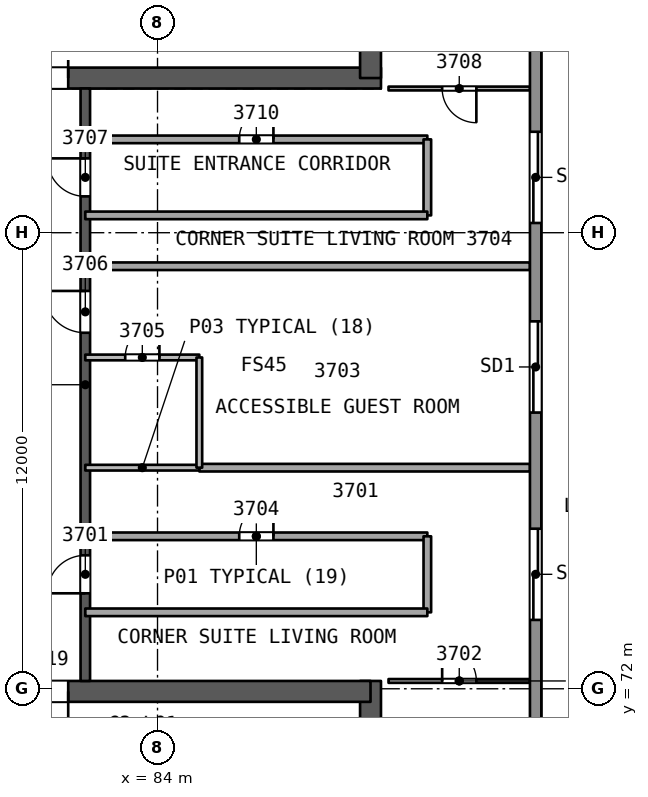
"""IFC4 building model, lengths in metres.
Left out: names, types, materials, properties, quantities, classifications, styles, units other than length and angle.
Written with IfcOpenShell. Run it as: python <this file> out.ifc"""

import sys

from ifc_helpers import new_model, si_unit, direction, frame, frame_2d, origin, place, context, subcontext, project, spatial, rectangle, extrude, element, fill, save


model = new_model("IFC4")
c1 = context("Model", 3, precision=1e-05, world=origin(), true_north=direction((0.0, 1.0)))
c2 = subcontext(c1, "Body", "Model", "MODEL_VIEW")
j1 = project(units=[si_unit("LENGTHUNIT", "METRE"), si_unit("PLANEANGLEUNIT", "RADIAN")], contexts=[c1])
p1 = place(None, origin())
s1 = spatial("IfcSite", under=j1, at=p1, CompositionType="ELEMENT")
p2 = place(p1, origin())
s2 = spatial("IfcBuilding", under=s1, at=p2, CompositionType="ELEMENT")
p3 = place(p2, frame((0.0, 0.0, 156.3)))
s3 = spatial("IfcBuildingStorey", under=s2, at=p3, CompositionType="ELEMENT", Elevation=156.3)
p4 = place(p3, frame((79.659, 88.069, 0.0), z_axis=(0.0, 0.0, 1.0), x_axis=(1.0, 0.0, 0.0)))
e1 = element("IfcWall", 1, at=p4, inside=s3, PredefinedType="SHEAR", context=c2, shape_type="SweptSolid", body=[
    extrude(rectangle(XDim=10.221, YDim=0.55, at=frame_2d((5.111, 0.0))), origin(), (0.0, 0.0, 1.0), 3.7),
])
p5 = place(p4, frame((0.791, 0.0, 0.0)))
e2 = element("IfcOpeningElement", 2, at=p5, cuts=e1, PredefinedType="OPENING", context=c2, shape_type="SweptSolid", body=[
    extrude(rectangle(XDim=1.2, YDim=2.1, at=frame_2d((0.6, 1.05))), frame((0.0, 0.286, 0.0), z_axis=(0.0, -1.0, 0.0), x_axis=(1.0, 0.0, 0.0)), (0.0, 0.0, 1.0), 0.571),
])
p6 = place(p3, frame((89.605, 88.069, 0.0), z_axis=(0.0, 0.0, 1.0), x_axis=(0.0, 1.0, 0.0)))
e3 = element("IfcWall", 3, at=p6, inside=s3, PredefinedType="SHEAR", context=c2, shape_type="SweptSolid", body=[
    extrude(rectangle(XDim=14.058, YDim=0.55, at=frame_2d((7.029, 0.0))), origin(), (0.0, 0.0, 1.0), 3.7),
])
p7 = place(p3, frame((89.605, 58.031, 0.0), z_axis=(0.0, 0.0, 1.0), x_axis=(0.0, 1.0, 0.0)))
e4 = element("IfcWall", 4, at=p7, inside=s3, PredefinedType="SHEAR", context=c2, shape_type="SweptSolid", body=[
    extrude(rectangle(XDim=14.175, YDim=0.55, at=frame_2d((7.087, 0.0))), origin(), (0.0, 0.0, 1.0), 3.7),
])
p8 = place(p3, frame((89.605, 71.931, 0.0), z_axis=(0.0, 0.0, 1.0), x_axis=(-1.0, 0.0, 0.0)))
e5 = element("IfcWall", 5, at=p8, inside=s3, PredefinedType="SHEAR", context=c2, shape_type="SweptSolid", body=[
    extrude(rectangle(XDim=10.105, YDim=0.55, at=frame_2d((5.052, 0.0))), origin(), (0.0, 0.0, 1.0), 3.7),
])
p9 = place(p8, frame((7.955, 0.0, 0.0)))
e6 = element("IfcOpeningElement", 6, at=p9, cuts=e5, PredefinedType="OPENING", context=c2, shape_type="SweptSolid", body=[
    extrude(rectangle(XDim=1.2, YDim=2.1, at=frame_2d((0.6, 1.05))), frame((0.0, 0.286, 0.0), z_axis=(0.0, -1.0, 0.0), x_axis=(1.0, 0.0, 0.0)), (0.0, 0.0, 1.0), 0.571),
])
p10 = place(p3, frame((82.1, 72.206, 0.0), z_axis=(0.0, 0.0, 1.0), x_axis=(0.0, 1.0, 0.0)))
e7 = element("IfcWall", 7, at=p10, inside=s3, PredefinedType="SHEAR", context=c2, shape_type="SweptSolid", body=[
    extrude(rectangle(XDim=15.588, YDim=0.25, at=frame_2d((7.794, 0.0))), origin(), (0.0, 0.0, 1.0), 3.25),
])
p11 = place(p10, frame((2.306, 0.0, 0.0)))
e8 = element("IfcOpeningElement", 8, at=p11, cuts=e7, PredefinedType="OPENING", context=c2, shape_type="SweptSolid", body=[
    extrude(rectangle(XDim=1.0, YDim=2.1, at=frame_2d((0.5, 1.05))), frame((0.0, 0.135, 0.0), z_axis=(0.0, -1.0, 0.0), x_axis=(1.0, 0.0, 0.0)), (0.0, 0.0, 1.0), 0.271),
])
p12 = place(p10, frame((9.162, 0.0, 0.0)))
e9 = element("IfcOpeningElement", 9, at=p12, cuts=e7, PredefinedType="OPENING", context=c2, shape_type="SweptSolid", body=[
    extrude(rectangle(XDim=1.1, YDim=2.1, at=frame_2d((0.55, 1.05))), frame((0.0, 0.135, 0.0), z_axis=(0.0, -1.0, 0.0), x_axis=(1.0, 0.0, 0.0)), (0.0, 0.0, 1.0), 0.271),
])
p13 = place(p10, frame((12.75, 0.0, 0.0)))
e10 = element("IfcOpeningElement", 10, at=p13, cuts=e7, PredefinedType="OPENING", context=c2, shape_type="SweptSolid", body=[
    extrude(rectangle(XDim=1.0, YDim=2.1, at=frame_2d((0.5, 1.05))), frame((0.0, 0.135, 0.0), z_axis=(0.0, -1.0, 0.0), x_axis=(1.0, 0.0, 0.0)), (0.0, 0.0, 1.0), 0.271),
])
p14 = place(p3, frame((90.079, 72.206, 0.0), z_axis=(0.0, 0.0, 1.0), x_axis=(1.0, 0.0, 0.0)))
e11 = element("IfcWall", 11, at=p14, inside=s3, PredefinedType="PARTITIONING", context=c2, shape_type="SweptSolid", body=[
    extrude(rectangle(XDim=3.722, YDim=0.1, at=frame_2d((1.861, 0.0))), origin(), (0.0, 0.0, 1.0), 3.25),
])
p15 = place(p14, frame((1.411, 0.0, 0.0)))
e12 = element("IfcOpeningElement", 12, at=p15, cuts=e11, PredefinedType="OPENING", context=c2, shape_type="SweptSolid", body=[
    extrude(rectangle(XDim=0.9, YDim=2.1, at=frame_2d((0.45, 1.05))), frame((0.0, 0.061, 0.0), z_axis=(0.0, -1.0, 0.0), x_axis=(1.0, 0.0, 0.0)), (0.0, 0.0, 1.0), 0.121),
])
p16 = place(p3, frame((82.1, 76.012, 0.0), z_axis=(0.0, 0.0, 1.0), x_axis=(1.0, 0.0, 0.0)))
e13 = element("IfcWall", 13, at=p16, inside=s3, PredefinedType="PARTITIONING", context=c2, shape_type="SweptSolid", body=[
    extrude(rectangle(XDim=9.0, YDim=0.2, at=frame_2d((4.5, 0.0))), origin(), (0.0, 0.0, 1.0), 3.25),
])
p17 = place(p16, frame((4.05, 0.0, 0.0)))
e14 = element("IfcOpeningElement", 14, at=p17, cuts=e13, PredefinedType="OPENING", context=c2, shape_type="SweptSolid", body=[
    extrude(rectangle(XDim=0.9, YDim=2.1, at=frame_2d((0.45, 1.05))), frame((0.0, 0.11, 0.0), z_axis=(0.0, -1.0, 0.0), x_axis=(1.0, 0.0, 0.0)), (0.0, 0.0, 1.0), 0.221),
])
p18 = place(p3, frame((91.1, 76.012, 0.0), z_axis=(0.0, 0.0, 1.0), x_axis=(0.0, -1.0, 0.0)))
e15 = element("IfcWall", 15, at=p18, inside=s3, PredefinedType="PARTITIONING", context=c2, shape_type="SweptSolid", body=[
    extrude(rectangle(XDim=2.0, YDim=0.2, at=frame_2d((1.0, 0.0))), origin(), (0.0, 0.0, 1.0), 3.25),
])
p19 = place(p3, frame((91.1, 74.012, 0.0), z_axis=(0.0, 0.0, 1.0), x_axis=(-1.0, 0.0, 0.0)))
e16 = element("IfcWall", 16, at=p19, inside=s3, PredefinedType="PARTITIONING", context=c2, shape_type="SweptSolid", body=[
    extrude(rectangle(XDim=9.0, YDim=0.2, at=frame_2d((4.5, 0.0))), origin(), (0.0, 0.0, 1.0), 3.25),
])
p20 = place(p3, frame((93.801, 77.818, 0.0), z_axis=(0.0, 0.0, 1.0), x_axis=(-1.0, 0.0, 0.0)))
e17 = element("IfcWall", 17, at=p20, inside=s3, PredefinedType="PARTITIONING", context=c2, shape_type="SweptSolid", body=[
    extrude(rectangle(XDim=8.701, YDim=0.2, at=frame_2d((4.351, 0.0))), origin(), (0.0, 0.0, 1.0), 3.25),
])
p21 = place(p3, frame((85.1, 77.818, 0.0), z_axis=(0.0, 0.0, 1.0), x_axis=(-1.0, 0.0, 0.0)))
e18 = element("IfcWall", 18, at=p21, inside=s3, PredefinedType="PARTITIONING", context=c2, shape_type="SweptSolid", body=[
    extrude(rectangle(XDim=3.0, YDim=0.15, at=frame_2d((1.5, 0.0))), origin(), (0.0, 0.0, 1.0), 3.25),
])
p22 = place(p3, frame((82.1, 80.718, 0.0), z_axis=(0.0, 0.0, 1.0), x_axis=(1.0, 0.0, 0.0)))
e19 = element("IfcWall", 19, at=p22, inside=s3, PredefinedType="PARTITIONING", context=c2, shape_type="SweptSolid", body=[
    extrude(rectangle(XDim=3.0, YDim=0.15, at=frame_2d((1.5, 0.0))), origin(), (0.0, 0.0, 1.0), 3.25),
])
p23 = place(p22, frame((1.05, 0.0, 0.0)))
e20 = element("IfcOpeningElement", 20, at=p23, cuts=e19, PredefinedType="OPENING", context=c2, shape_type="SweptSolid", body=[
    extrude(rectangle(XDim=0.9, YDim=2.1, at=frame_2d((0.45, 1.05))), frame((0.0, 0.085, 0.0), z_axis=(0.0, -1.0, 0.0), x_axis=(1.0, 0.0, 0.0)), (0.0, 0.0, 1.0), 0.171),
])
p24 = place(p3, frame((85.1, 80.718, 0.0), z_axis=(0.0, 0.0, 1.0), x_axis=(0.0, -1.0, 0.0)))
e21 = element("IfcWall", 21, at=p24, inside=s3, PredefinedType="PARTITIONING", context=c2, shape_type="SweptSolid", body=[
    extrude(rectangle(XDim=2.9, YDim=0.15, at=frame_2d((1.45, 0.0))), origin(), (0.0, 0.0, 1.0), 3.25),
])
p25 = place(p3, frame((93.801, 83.118, 0.0), z_axis=(0.0, 0.0, 1.0), x_axis=(-1.0, 0.0, 0.0)))
e22 = element("IfcWall", 22, at=p25, inside=s3, PredefinedType="PARTITIONING", context=c2, shape_type="SweptSolid", body=[
    extrude(rectangle(XDim=11.701, YDim=0.2, at=frame_2d((5.851, 0.0))), origin(), (0.0, 0.0, 1.0), 3.25),
])
p26 = place(p3, frame((93.801, 87.794, 0.0), z_axis=(0.0, 0.0, 1.0), x_axis=(-1.0, 0.0, 0.0)))
e23 = element("IfcWall", 23, at=p26, inside=s3, PredefinedType="PARTITIONING", context=c2, shape_type="SweptSolid", body=[
    extrude(rectangle(XDim=3.722, YDim=0.1, at=frame_2d((1.861, 0.0))), origin(), (0.0, 0.0, 1.0), 3.25),
])
p27 = place(p26, frame((1.411, 0.0, 0.0)))
e24 = element("IfcOpeningElement", 24, at=p27, cuts=e23, PredefinedType="OPENING", context=c2, shape_type="SweptSolid", body=[
    extrude(rectangle(XDim=0.9, YDim=2.1, at=frame_2d((0.45, 1.05))), frame((0.0, 0.061, 0.0), z_axis=(0.0, -1.0, 0.0), x_axis=(1.0, 0.0, 0.0)), (0.0, 0.0, 1.0), 0.121),
])
p28 = place(p3, frame((82.1, 86.456, 0.0), z_axis=(0.0, 0.0, 1.0), x_axis=(1.0, 0.0, 0.0)))
e25 = element("IfcWall", 25, at=p28, inside=s3, PredefinedType="PARTITIONING", context=c2, shape_type="SweptSolid", body=[
    extrude(rectangle(XDim=9.0, YDim=0.2, at=frame_2d((4.5, 0.0))), origin(), (0.0, 0.0, 1.0), 3.25),
])
p29 = place(p28, frame((4.05, 0.0, 0.0)))
e26 = element("IfcOpeningElement", 26, at=p29, cuts=e25, PredefinedType="OPENING", context=c2, shape_type="SweptSolid", body=[
    extrude(rectangle(XDim=0.9, YDim=2.1, at=frame_2d((0.45, 1.05))), frame((0.0, 0.11, 0.0), z_axis=(0.0, -1.0, 0.0), x_axis=(1.0, 0.0, 0.0)), (0.0, 0.0, 1.0), 0.221),
])
p30 = place(p3, frame((91.1, 86.456, 0.0), z_axis=(0.0, 0.0, 1.0), x_axis=(0.0, -1.0, 0.0)))
e27 = element("IfcWall", 27, at=p30, inside=s3, PredefinedType="PARTITIONING", context=c2, shape_type="SweptSolid", body=[
    extrude(rectangle(XDim=2.0, YDim=0.2, at=frame_2d((1.0, 0.0))), origin(), (0.0, 0.0, 1.0), 3.25),
])
p31 = place(p3, frame((91.1, 84.456, 0.0), z_axis=(0.0, 0.0, 1.0), x_axis=(-1.0, 0.0, 0.0)))
e28 = element("IfcWall", 28, at=p31, inside=s3, PredefinedType="PARTITIONING", context=c2, shape_type="SweptSolid", body=[
    extrude(rectangle(XDim=9.0, YDim=0.2, at=frame_2d((4.5, 0.0))), origin(), (0.0, 0.0, 1.0), 3.25),
])
p32 = place(p3, frame((93.95, 107.247, 0.0), z_axis=(0.0, 0.0, 1.0), x_axis=(0.0, -1.0, 0.0)))
e29 = element("IfcWall", 29, at=p32, inside=s3, PredefinedType="SOLIDWALL", context=c2, shape_type="SweptSolid", body=[
    extrude(rectangle(XDim=54.494, YDim=0.3, at=frame_2d((27.247, 0.0))), origin(), (0.0, 0.0, 1.0), 3.25),
])
p33 = place(p32, frame((25.579, 0.0, 0.0)))
e30 = element("IfcOpeningElement", 30, at=p33, cuts=e29, PredefinedType="OPENING", context=c2, shape_type="SweptSolid", body=[
    extrude(rectangle(XDim=2.4, YDim=2.4, at=frame_2d((1.2, 1.2))), frame((0.0, 0.161, 0.0), z_axis=(0.0, -1.0, 0.0), x_axis=(1.0, 0.0, 0.0)), (0.0, 0.0, 1.0), 0.321),
])
p34 = place(p32, frame((31.035, 0.0, 0.0)))
e31 = element("IfcOpeningElement", 31, at=p34, cuts=e29, PredefinedType="OPENING", context=c2, shape_type="SweptSolid", body=[
    extrude(rectangle(XDim=2.4, YDim=2.4, at=frame_2d((1.2, 1.2))), frame((0.0, 0.161, 0.0), z_axis=(0.0, -1.0, 0.0), x_axis=(1.0, 0.0, 0.0)), (0.0, 0.0, 1.0), 0.321),
])
p35 = place(p32, frame((42.339, 0.0, 0.0)))
e32 = element("IfcOpeningElement", 32, at=p35, cuts=e29, PredefinedType="OPENING", context=c2, shape_type="SweptSolid", body=[
    extrude(rectangle(XDim=2.4, YDim=2.4, at=frame_2d((1.2, 1.2))), frame((0.0, 0.161, 0.0), z_axis=(0.0, -1.0, 0.0), x_axis=(1.0, 0.0, 0.0)), (0.0, 0.0, 1.0), 0.321),
])
p36 = place(p32, frame((20.591, 0.0, 0.0)))
e33 = element("IfcOpeningElement", 33, at=p36, cuts=e29, PredefinedType="OPENING", context=c2, shape_type="SweptSolid", body=[
    extrude(rectangle(XDim=2.4, YDim=2.4, at=frame_2d((1.2, 1.2))), frame((0.0, 0.161, 0.0), z_axis=(0.0, -1.0, 0.0), x_axis=(1.0, 0.0, 0.0)), (0.0, 0.0, 1.0), 0.321),
])
p37 = place(p32, frame((9.744, 0.0, 0.0)))
e34 = element("IfcOpeningElement", 34, at=p37, cuts=e29, PredefinedType="OPENING", context=c2, shape_type="SweptSolid", body=[
    extrude(rectangle(XDim=2.4, YDim=2.4, at=frame_2d((1.2, 1.2))), frame((0.0, 0.161, 0.0), z_axis=(0.0, -1.0, 0.0), x_axis=(1.0, 0.0, 0.0)), (0.0, 0.0, 1.0), 0.321),
])
p38 = place(p3, frame((41.928, 82.788, 0.0), z_axis=(0.0, 0.0, 1.0), x_axis=(0.866025629663, 0.499999608766, 0.0)))
e35 = element("IfcWall", 35, at=p38, inside=s3, PredefinedType="SOLIDWALL", context=c2, shape_type="SweptSolid", body=[
    extrude(rectangle(XDim=54.494, YDim=0.3, at=frame_2d((27.247, 0.0))), origin(), (0.0, 0.0, 1.0), 3.25),
])
p39 = place(p38, frame((26.826, 0.0, 0.0)))
e36 = element("IfcOpeningElement", 36, at=p39, cuts=e35, PredefinedType="OPENING", context=c2, shape_type="SweptSolid", body=[
    extrude(rectangle(XDim=2.4, YDim=2.4, at=frame_2d((1.2, 1.2))), frame((0.0, 0.161, 0.0), z_axis=(0.0, -1.0, 0.0), x_axis=(1.0, 0.0, 0.0)), (0.0, 0.0, 1.0), 0.321),
])
p40 = place(p38, frame((31.815, 0.0, 0.0)))
e37 = element("IfcOpeningElement", 37, at=p40, cuts=e35, PredefinedType="OPENING", context=c2, shape_type="SweptSolid", body=[
    extrude(rectangle(XDim=2.4, YDim=2.4, at=frame_2d((1.2, 1.2))), frame((0.0, 0.161, 0.0), z_axis=(0.0, -1.0, 0.0), x_axis=(1.0, 0.0, 0.0)), (0.0, 0.0, 1.0), 0.321),
])
p41 = place(p38, frame((42.339, 0.0, 0.0)))
e38 = element("IfcOpeningElement", 38, at=p41, cuts=e35, PredefinedType="OPENING", context=c2, shape_type="SweptSolid", body=[
    extrude(rectangle(XDim=2.4, YDim=2.4, at=frame_2d((1.2, 1.2))), frame((0.0, 0.161, 0.0), z_axis=(0.0, -1.0, 0.0), x_axis=(1.0, 0.0, 0.0)), (0.0, 0.0, 1.0), 0.321),
])
p42 = place(p38, frame((11.289, 0.0, 0.0)))
e39 = element("IfcOpeningElement", 39, at=p42, cuts=e35, PredefinedType="OPENING", context=c2, shape_type="SweptSolid", body=[
    extrude(rectangle(XDim=2.4, YDim=2.4, at=frame_2d((1.2, 1.2))), frame((0.0, 0.161, 0.0), z_axis=(0.0, -1.0, 0.0), x_axis=(1.0, 0.0, 0.0)), (0.0, 0.0, 1.0), 0.321),
])
p43 = place(p3, frame((89.122, 49.965, 0.0), z_axis=(0.0, 0.0, 1.0), x_axis=(-0.866025629663, 0.499999608766, 0.0)))
e40 = element("IfcWall", 40, at=p43, inside=s3, PredefinedType="SOLIDWALL", context=c2, shape_type="SweptSolid", body=[
    extrude(rectangle(XDim=54.494, YDim=0.3, at=frame_2d((27.247, 0.0))), origin(), (0.0, 0.0, 1.0), 3.25),
])
p44 = place(p43, frame((41.273, 0.0, 0.0)))
e41 = element("IfcOpeningElement", 41, at=p44, cuts=e40, PredefinedType="OPENING", context=c2, shape_type="SweptSolid", body=[
    extrude(rectangle(XDim=2.4, YDim=2.4, at=frame_2d((1.2, 1.2))), frame((0.0, 0.161, 0.0), z_axis=(0.0, -1.0, 0.0), x_axis=(1.0, 0.0, 0.0)), (0.0, 0.0, 1.0), 0.321),
])
p45 = place(p43, frame((11.289, 0.0, 0.0)))
e42 = element("IfcOpeningElement", 42, at=p45, cuts=e40, PredefinedType="OPENING", context=c2, shape_type="SweptSolid", body=[
    extrude(rectangle(XDim=2.4, YDim=2.4, at=frame_2d((1.2, 1.2))), frame((0.0, 0.161, 0.0), z_axis=(0.0, -1.0, 0.0), x_axis=(1.0, 0.0, 0.0)), (0.0, 0.0, 1.0), 0.321),
])
p46 = place(p43, frame((28.14, 0.0, 0.9)))
e43 = element("IfcOpeningElement", 43, at=p46, cuts=e40, PredefinedType="OPENING", context=c2, shape_type="SweptSolid", body=[
    extrude(rectangle(XDim=1.8, YDim=1.5, at=frame_2d((0.9, 0.75))), frame((0.0, 0.161, 0.0), z_axis=(0.0, -1.0, 0.0), x_axis=(1.0, 0.0, 0.0)), (0.0, 0.0, 1.0), 0.321),
])
p47 = place(p43, frame((25.49, 0.0, 0.9)))
e44 = element("IfcOpeningElement", 44, at=p47, cuts=e40, PredefinedType="OPENING", context=c2, shape_type="SweptSolid", body=[
    extrude(rectangle(XDim=1.8, YDim=1.5, at=frame_2d((0.9, 0.75))), frame((0.0, 0.161, 0.0), z_axis=(0.0, -1.0, 0.0), x_axis=(1.0, 0.0, 0.0)), (0.0, 0.0, 1.0), 0.321),
])
p48 = place(p11, origin())
e45 = element("IfcDoor", 45, at=p48, inside=s3, OperationType="SINGLE_SWING_LEFT", PredefinedType="NOTDEFINED", context=c2, shape_type="SweptSolid", body=[
    extrude(rectangle(XDim=1.0, YDim=2.1, at=frame_2d((0.5, 1.05))), frame((0.0, 0.025, 0.0), z_axis=(0.0, -1.0, 0.0), x_axis=(1.0, 0.0, 0.0)), (0.0, 0.0, 1.0), 0.05),
])
fill(e8, e45)
p49 = place(p15, origin())
e46 = element("IfcDoor", 46, at=p49, inside=s3, OperationType="SINGLE_SWING_LEFT", PredefinedType="NOTDEFINED", context=c2, shape_type="SweptSolid", body=[
    extrude(rectangle(XDim=0.9, YDim=2.1, at=frame_2d((0.45, 1.05))), frame((0.0, 0.025, 0.0), z_axis=(0.0, -1.0, 0.0), x_axis=(1.0, 0.0, 0.0)), (0.0, 0.0, 1.0), 0.05),
])
fill(e12, e46)
p50 = place(p17, origin())
e47 = element("IfcDoor", 47, at=p50, inside=s3, OperationType="SINGLE_SWING_RIGHT", PredefinedType="NOTDEFINED", context=c2, shape_type="SweptSolid", body=[
    extrude(rectangle(XDim=0.9, YDim=2.1, at=frame_2d((0.45, 1.05))), frame((0.0, 0.025, 0.0), z_axis=(0.0, -1.0, 0.0), x_axis=(1.0, 0.0, 0.0)), (0.0, 0.0, 1.0), 0.05),
])
fill(e14, e47)
p51 = place(p23, origin())
e48 = element("IfcDoor", 48, at=p51, inside=s3, OperationType="SINGLE_SWING_RIGHT", PredefinedType="NOTDEFINED", context=c2, shape_type="SweptSolid", body=[
    extrude(rectangle(XDim=0.9, YDim=2.1, at=frame_2d((0.45, 1.05))), frame((0.0, 0.025, 0.0), z_axis=(0.0, -1.0, 0.0), x_axis=(1.0, 0.0, 0.0)), (0.0, 0.0, 1.0), 0.05),
])
fill(e20, e48)
p52 = place(p12, origin())
e49 = element("IfcDoor", 49, at=p52, inside=s3, OperationType="SINGLE_SWING_RIGHT", PredefinedType="NOTDEFINED", context=c2, shape_type="SweptSolid", body=[
    extrude(rectangle(XDim=1.1, YDim=2.1, at=frame_2d((0.55, 1.05))), frame((0.0, 0.025, 0.0), z_axis=(0.0, -1.0, 0.0), x_axis=(1.0, 0.0, 0.0)), (0.0, 0.0, 1.0), 0.05),
])
fill(e9, e49)
p53 = place(p13, origin())
e50 = element("IfcDoor", 50, at=p53, inside=s3, OperationType="SINGLE_SWING_RIGHT", PredefinedType="NOTDEFINED", context=c2, shape_type="SweptSolid", body=[
    extrude(rectangle(XDim=1.0, YDim=2.1, at=frame_2d((0.5, 1.05))), frame((0.0, 0.025, 0.0), z_axis=(0.0, -1.0, 0.0), x_axis=(1.0, 0.0, 0.0)), (0.0, 0.0, 1.0), 0.05),
])
fill(e10, e50)
p54 = place(p27, origin())
e51 = element("IfcDoor", 51, at=p54, inside=s3, OperationType="SINGLE_SWING_LEFT", PredefinedType="NOTDEFINED", context=c2, shape_type="SweptSolid", body=[
    extrude(rectangle(XDim=0.9, YDim=2.1, at=frame_2d((0.45, 1.05))), frame((0.0, 0.025, 0.0), z_axis=(0.0, -1.0, 0.0), x_axis=(1.0, 0.0, 0.0)), (0.0, 0.0, 1.0), 0.05),
])
fill(e24, e51)
p55 = place(p29, origin())
e52 = element("IfcDoor", 52, at=p55, inside=s3, OperationType="SINGLE_SWING_RIGHT", PredefinedType="NOTDEFINED", context=c2, shape_type="SweptSolid", body=[
    extrude(rectangle(XDim=0.9, YDim=2.1, at=frame_2d((0.45, 1.05))), frame((0.0, 0.025, 0.0), z_axis=(0.0, -1.0, 0.0), x_axis=(1.0, 0.0, 0.0)), (0.0, 0.0, 1.0), 0.05),
])
fill(e26, e52)
p56 = place(p33, origin())
e53 = element("IfcDoor", 53, at=p56, inside=s3, OperationType="SLIDING_TO_LEFT", PredefinedType="NOTDEFINED", context=c2, shape_type="SweptSolid", body=[
    extrude(rectangle(XDim=2.4, YDim=2.4, at=frame_2d((1.2, 1.2))), frame((0.0, 0.025, 0.0), z_axis=(0.0, -1.0, 0.0), x_axis=(1.0, 0.0, 0.0)), (0.0, 0.0, 1.0), 0.05),
])
fill(e30, e53)
p57 = place(p34, origin())
e54 = element("IfcDoor", 54, at=p57, inside=s3, OperationType="SLIDING_TO_RIGHT", PredefinedType="NOTDEFINED", context=c2, shape_type="SweptSolid", body=[
    extrude(rectangle(XDim=2.4, YDim=2.4, at=frame_2d((1.2, 1.2))), frame((0.0, 0.025, 0.0), z_axis=(0.0, -1.0, 0.0), x_axis=(1.0, 0.0, 0.0)), (0.0, 0.0, 1.0), 0.05),
])
fill(e31, e54)
p58 = place(p36, origin())
e55 = element("IfcDoor", 55, at=p58, inside=s3, OperationType="SLIDING_TO_RIGHT", PredefinedType="NOTDEFINED", context=c2, shape_type="SweptSolid", body=[
    extrude(rectangle(XDim=2.4, YDim=2.4, at=frame_2d((1.2, 1.2))), frame((0.0, 0.025, 0.0), z_axis=(0.0, -1.0, 0.0), x_axis=(1.0, 0.0, 0.0)), (0.0, 0.0, 1.0), 0.05),
])
fill(e33, e55)
p59 = place(p5, origin())
e56 = element("IfcDoor", 56, at=p59, inside=s3, OperationType="SINGLE_SWING_RIGHT", PredefinedType="NOTDEFINED", context=c2, shape_type="SweptSolid", body=[
    extrude(rectangle(XDim=1.2, YDim=2.1, at=frame_2d((0.6, 1.05))), frame((0.0, 0.025, 0.0), z_axis=(0.0, -1.0, 0.0), x_axis=(1.0, 0.0, 0.0)), (0.0, 0.0, 1.0), 0.05),
])
fill(e2, e56)
p60 = place(p9, origin())
e57 = element("IfcDoor", 57, at=p60, inside=s3, OperationType="SINGLE_SWING_LEFT", PredefinedType="NOTDEFINED", context=c2, shape_type="SweptSolid", body=[
    extrude(rectangle(XDim=1.2, YDim=2.1, at=frame_2d((0.6, 1.05))), frame((0.0, 0.025, 0.0), z_axis=(0.0, -1.0, 0.0), x_axis=(1.0, 0.0, 0.0)), (0.0, 0.0, 1.0), 0.05),
])
fill(e6, e57)
save(model, sys.argv[1])
